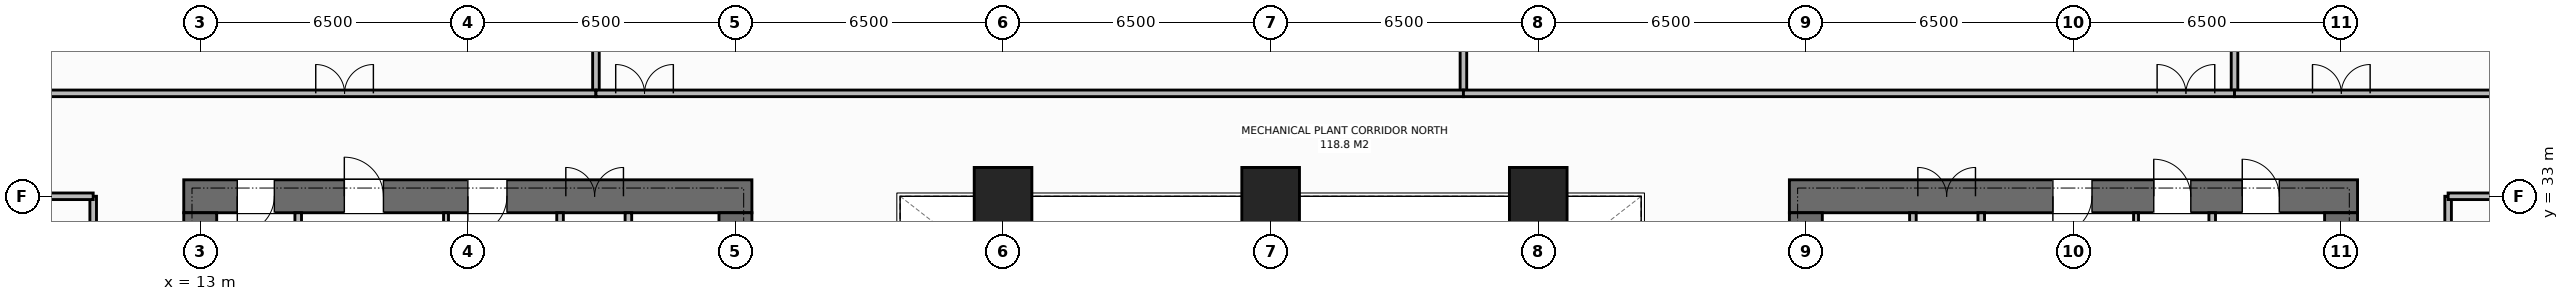
"""IFC4 building model, lengths in metres.
Left out: names, types, materials, properties, quantities, classifications, styles, units other than length and angle.
Written with IfcOpenShell. Run it as: python <this file> out.ifc"""

import sys

from ifc_helpers import new_model, si_unit, direction, frame, frame_2d, origin, origin_2d, place, context, subcontext, project, spatial, rectangle, extrude, element, fill, save


model = new_model("IFC4")
c1 = context("Model", 3, precision=1e-05, world=origin(), true_north=direction((0.0, 1.0)))
c2 = subcontext(c1, "Body", "Model", "MODEL_VIEW")
j1 = project(units=[si_unit("LENGTHUNIT", "METRE"), si_unit("PLANEANGLEUNIT", "RADIAN")], contexts=[c1])
p1 = place(None, origin())
s1 = spatial("IfcSite", under=j1, at=p1, CompositionType="ELEMENT")
p2 = place(p1, origin())
s2 = spatial("IfcBuilding", under=s1, at=p2, CompositionType="ELEMENT")
p3 = place(p2, frame((0.0, 0.0, 81.0)))
s3 = spatial("IfcBuildingStorey", under=s2, at=p3, CompositionType="ELEMENT", Elevation=81.0)
p4 = place(p3, frame((12.6, 33.0, 0.0), z_axis=(0.0, 0.0, 1.0), x_axis=(1.0, 0.0, 0.0)))
e1 = element("IfcWall", 1, at=p4, inside=s3, PredefinedType="SHEAR", context=c2, shape_type="SweptSolid", body=[
    extrude(rectangle(XDim=13.8, YDim=0.8, at=frame_2d((6.9, 0.0))), origin(), (0.0, 0.0, 1.0), 5.0),
])
p5 = place(p4, frame((1.3, 0.0, 0.0)))
e2 = element("IfcOpeningElement", 2, at=p5, cuts=e1, PredefinedType="OPENING", context=c2, shape_type="SweptSolid", body=[
    extrude(rectangle(XDim=0.9, YDim=2.15, at=frame_2d((0.45, 1.075))), frame((0.0, 0.41, 0.0), z_axis=(0.0, -1.0, 0.0), x_axis=(1.0, 0.0, 0.0)), (0.0, 0.0, 1.0), 0.82),
])
p6 = place(p4, frame((3.9, 0.0, 0.0)))
e3 = element("IfcOpeningElement", 3, at=p6, cuts=e1, PredefinedType="OPENING", context=c2, shape_type="SweptSolid", body=[
    extrude(rectangle(XDim=0.95, YDim=2.15, at=frame_2d((0.475, 1.075))), frame((0.0, 0.41, 0.0), z_axis=(0.0, -1.0, 0.0), x_axis=(1.0, 0.0, 0.0)), (0.0, 0.0, 1.0), 0.82),
])
p7 = place(p4, frame((6.9, 0.0, 0.0)))
e4 = element("IfcOpeningElement", 4, at=p7, cuts=e1, PredefinedType="OPENING", context=c2, shape_type="SweptSolid", body=[
    extrude(rectangle(XDim=0.95, YDim=2.15, at=frame_2d((0.475, 1.075))), frame((0.0, 0.41, 0.0), z_axis=(0.0, -1.0, 0.0), x_axis=(1.0, 0.0, 0.0)), (0.0, 0.0, 1.0), 0.82),
])
p8 = place(p4, frame((9.28, 0.0, 0.0)))
e5 = element("IfcOpeningElement", 5, at=p8, cuts=e1, PredefinedType="OPENING", context=c2, shape_type="SweptSolid", body=[
    extrude(rectangle(XDim=1.4, YDim=2.2, at=frame_2d((0.7, 1.1))), frame((0.0, 0.41, 0.0), z_axis=(0.0, -1.0, 0.0), x_axis=(1.0, 0.0, 0.0)), (0.0, 0.0, 1.0), 0.82),
])
p9 = place(p3, frame((13.0, 19.4, 0.0), z_axis=(0.0, 0.0, 1.0), x_axis=(0.0, 1.0, 0.0)))
e6 = element("IfcWall", 6, at=p9, inside=s3, PredefinedType="SHEAR", context=c2, shape_type="SweptSolid", body=[
    extrude(rectangle(XDim=13.2, YDim=0.8, at=frame_2d((6.6, 0.0))), origin(), (0.0, 0.0, 1.0), 5.0),
])
p10 = place(p9, frame((4.65, 0.0, 0.0)))
e7 = element("IfcOpeningElement", 7, at=p10, cuts=e6, PredefinedType="OPENING", context=c2, shape_type="SweptSolid", body=[
    extrude(rectangle(XDim=1.4, YDim=2.2, at=frame_2d((0.7, 1.1))), frame((0.0, 0.41, 0.0), z_axis=(0.0, -1.0, 0.0), x_axis=(1.0, 0.0, 0.0)), (0.0, 0.0, 1.0), 0.82),
])
p11 = place(p3, frame((26.0, 19.4, 0.0), z_axis=(0.0, 0.0, 1.0), x_axis=(0.0, 1.0, 0.0)))
e8 = element("IfcWall", 8, at=p11, inside=s3, PredefinedType="SHEAR", context=c2, shape_type="SweptSolid", body=[
    extrude(rectangle(XDim=13.2, YDim=0.8, at=frame_2d((6.6, 0.0))), origin(), (0.0, 0.0, 1.0), 5.0),
])
p12 = place(p3, frame((51.6, 33.0, 0.0), z_axis=(0.0, 0.0, 1.0), x_axis=(1.0, 0.0, 0.0)))
e9 = element("IfcWall", 9, at=p12, inside=s3, PredefinedType="SHEAR", context=c2, shape_type="SweptSolid", body=[
    extrude(rectangle(XDim=13.8, YDim=0.8, at=frame_2d((6.9, 0.0))), origin(), (0.0, 0.0, 1.0), 5.0),
])
p13 = place(p12, frame((3.12, 0.0, 0.0)))
e10 = element("IfcOpeningElement", 10, at=p13, cuts=e9, PredefinedType="OPENING", context=c2, shape_type="SweptSolid", body=[
    extrude(rectangle(XDim=1.4, YDim=2.2, at=frame_2d((0.7, 1.1))), frame((0.0, 0.41, 0.0), z_axis=(0.0, -1.0, 0.0), x_axis=(1.0, 0.0, 0.0)), (0.0, 0.0, 1.0), 0.82),
])
p14 = place(p12, frame((11.0, 0.0, 0.0)))
e11 = element("IfcOpeningElement", 11, at=p14, cuts=e9, PredefinedType="OPENING", context=c2, shape_type="SweptSolid", body=[
    extrude(rectangle(XDim=0.9, YDim=2.15, at=frame_2d((0.45, 1.075))), frame((0.0, 0.41, 0.0), z_axis=(0.0, -1.0, 0.0), x_axis=(1.0, 0.0, 0.0)), (0.0, 0.0, 1.0), 0.82),
])
p15 = place(p12, frame((6.4, 0.0, 0.0)))
e12 = element("IfcOpeningElement", 12, at=p15, cuts=e9, PredefinedType="OPENING", context=c2, shape_type="SweptSolid", body=[
    extrude(rectangle(XDim=0.95, YDim=2.15, at=frame_2d((0.475, 1.075))), frame((0.0, 0.41, 0.0), z_axis=(0.0, -1.0, 0.0), x_axis=(1.0, 0.0, 0.0)), (0.0, 0.0, 1.0), 0.82),
])
p16 = place(p12, frame((8.85, 0.0, 0.0)))
e13 = element("IfcOpeningElement", 13, at=p16, cuts=e9, PredefinedType="OPENING", context=c2, shape_type="SweptSolid", body=[
    extrude(rectangle(XDim=0.9, YDim=2.15, at=frame_2d((0.45, 1.075))), frame((0.0, 0.41, 0.0), z_axis=(0.0, -1.0, 0.0), x_axis=(1.0, 0.0, 0.0)), (0.0, 0.0, 1.0), 0.82),
])
p17 = place(p3, frame((52.0, 19.4, 0.0), z_axis=(0.0, 0.0, 1.0), x_axis=(0.0, 1.0, 0.0)))
e14 = element("IfcWall", 14, at=p17, inside=s3, PredefinedType="SHEAR", context=c2, shape_type="SweptSolid", body=[
    extrude(rectangle(XDim=13.2, YDim=0.8, at=frame_2d((6.6, 0.0))), origin(), (0.0, 0.0, 1.0), 5.0),
])
p18 = place(p3, frame((65.0, 19.4, 0.0), z_axis=(0.0, 0.0, 1.0), x_axis=(0.0, 1.0, 0.0)))
e15 = element("IfcWall", 15, at=p18, inside=s3, PredefinedType="SHEAR", context=c2, shape_type="SweptSolid", body=[
    extrude(rectangle(XDim=13.2, YDim=0.8, at=frame_2d((6.6, 0.0))), origin(), (0.0, 0.0, 1.0), 5.0),
])
p19 = place(p18, frame((8.05, 0.0, 0.0)))
e16 = element("IfcOpeningElement", 16, at=p19, cuts=e15, PredefinedType="OPENING", context=c2, shape_type="SweptSolid", body=[
    extrude(rectangle(XDim=1.3, YDim=2.2, at=frame_2d((0.65, 1.1))), frame((0.0, 0.41, 0.0), z_axis=(0.0, -1.0, 0.0), x_axis=(1.0, 0.0, 0.0)), (0.0, 0.0, 1.0), 0.82),
])
for number, where, z_axis, x_axis in (
    (17, (32.5, 33.0, 0.0), (0.0, 0.0, 1.0), (1.0, 0.0, 0.0)),
    (18, (39.0, 33.0, 0.0), (0.0, 0.0, 1.0), (1.0, 0.0, 0.0)),
    (19, (45.5, 33.0, 0.0), (0.0, 0.0, 1.0), (1.0, 0.0, 0.0)),
):
    element("IfcColumn", number, at=place(p3, frame(where, z_axis=z_axis, x_axis=x_axis)), inside=s3, PredefinedType="COLUMN", context=c2, shape_type="SweptSolid", body=[
        extrude(rectangle(XDim=1.4, YDim=1.4, at=origin_2d()), origin(), (0.0, 0.0, 1.0), 5.0),
    ])
p20 = place(p3, frame((15.38, 26.56, 0.0), z_axis=(0.0, 0.0, 1.0), x_axis=(0.0, 1.0, 0.0)))
e20 = element("IfcWall", 20, at=p20, inside=s3, PredefinedType="STANDARD", context=c2, shape_type="SweptSolid", body=[
    extrude(rectangle(XDim=6.04, YDim=0.16, at=frame_2d((3.02, 0.0))), origin(), (0.0, 0.0, 1.0), 4.765),
])
p21 = place(p3, frame((18.97, 26.56, 0.0), z_axis=(0.0, 0.0, 1.0), x_axis=(0.0, 1.0, 0.0)))
e21 = element("IfcWall", 21, at=p21, inside=s3, PredefinedType="PARTITIONING", context=c2, shape_type="SweptSolid", body=[
    extrude(rectangle(XDim=6.04, YDim=0.12, at=frame_2d((3.02, 0.0))), origin(), (0.0, 0.0, 1.0), 4.765),
])
p22 = place(p3, frame((21.74, 26.56, 0.0), z_axis=(0.0, 0.0, 1.0), x_axis=(0.0, 1.0, 0.0)))
e22 = element("IfcWall", 22, at=p22, inside=s3, PredefinedType="STANDARD", context=c2, shape_type="SweptSolid", body=[
    extrude(rectangle(XDim=6.04, YDim=0.16, at=frame_2d((3.02, 0.0))), origin(), (0.0, 0.0, 1.0), 4.765),
])
p23 = place(p3, frame((23.4, 19.4, 0.0), z_axis=(0.0, 0.0, 1.0), x_axis=(0.0, 1.0, 0.0)))
e23 = element("IfcWall", 23, at=p23, inside=s3, PredefinedType="STANDARD", context=c2, shape_type="SweptSolid", body=[
    extrude(rectangle(XDim=13.2, YDim=0.16, at=frame_2d((6.6, 0.0))), origin(), (0.0, 0.0, 1.0), 4.765),
])
p24 = place(p23, frame((0.55, 0.0, 0.0)))
e24 = element("IfcOpeningElement", 24, at=p24, cuts=e23, PredefinedType="OPENING", context=c2, shape_type="SweptSolid", body=[
    extrude(rectangle(XDim=1.1, YDim=2.2, at=frame_2d((0.55, 1.1))), frame((0.0, 0.09, 0.0), z_axis=(0.0, -1.0, 0.0), x_axis=(1.0, 0.0, 0.0)), (0.0, 0.0, 1.0), 0.18),
])
p25 = place(p23, frame((2.7, 0.0, 0.0)))
e25 = element("IfcOpeningElement", 25, at=p25, cuts=e23, PredefinedType="OPENING", context=c2, shape_type="SweptSolid", body=[
    extrude(rectangle(XDim=1.1, YDim=2.2, at=frame_2d((0.55, 1.1))), frame((0.0, 0.09, 0.0), z_axis=(0.0, -1.0, 0.0), x_axis=(1.0, 0.0, 0.0)), (0.0, 0.0, 1.0), 0.18),
])
p26 = place(p3, frame((54.6, 19.4, 0.0), z_axis=(0.0, 0.0, 1.0), x_axis=(0.0, 1.0, 0.0)))
e26 = element("IfcWall", 26, at=p26, inside=s3, PredefinedType="STANDARD", context=c2, shape_type="SweptSolid", body=[
    extrude(rectangle(XDim=13.2, YDim=0.16, at=frame_2d((6.6, 0.0))), origin(), (0.0, 0.0, 1.0), 4.765),
])
p27 = place(p26, frame((0.55, 0.0, 0.0)))
e27 = element("IfcOpeningElement", 27, at=p27, cuts=e26, PredefinedType="OPENING", context=c2, shape_type="SweptSolid", body=[
    extrude(rectangle(XDim=1.1, YDim=2.2, at=frame_2d((0.55, 1.1))), frame((0.0, 0.09, 0.0), z_axis=(0.0, -1.0, 0.0), x_axis=(1.0, 0.0, 0.0)), (0.0, 0.0, 1.0), 0.18),
])
p28 = place(p26, frame((2.7, 0.0, 0.0)))
e28 = element("IfcOpeningElement", 28, at=p28, cuts=e26, PredefinedType="OPENING", context=c2, shape_type="SweptSolid", body=[
    extrude(rectangle(XDim=1.1, YDim=2.2, at=frame_2d((0.55, 1.1))), frame((0.0, 0.09, 0.0), z_axis=(0.0, -1.0, 0.0), x_axis=(1.0, 0.0, 0.0)), (0.0, 0.0, 1.0), 0.18),
])
p29 = place(p3, frame((56.26, 23.09, 0.0), z_axis=(0.0, 0.0, 1.0), x_axis=(0.0, 1.0, 0.0)))
e29 = element("IfcWall", 29, at=p29, inside=s3, PredefinedType="STANDARD", context=c2, shape_type="SweptSolid", body=[
    extrude(rectangle(XDim=9.51, YDim=0.16, at=frame_2d((4.755, 0.0))), origin(), (0.0, 0.0, 1.0), 4.765),
])
p30 = place(p29, frame((1.01, 0.0, 0.0)))
e30 = element("IfcOpeningElement", 30, at=p30, cuts=e29, PredefinedType="OPENING", context=c2, shape_type="SweptSolid", body=[
    extrude(rectangle(XDim=1.3, YDim=2.2, at=frame_2d((0.65, 1.1))), frame((0.0, 0.09, 0.0), z_axis=(0.0, -1.0, 0.0), x_axis=(1.0, 0.0, 0.0)), (0.0, 0.0, 1.0), 0.18),
])
p31 = place(p3, frame((61.87, 26.56, 0.0), z_axis=(0.0, 0.0, 1.0), x_axis=(0.0, 1.0, 0.0)))
e31 = element("IfcWall", 31, at=p31, inside=s3, PredefinedType="STANDARD", context=c2, shape_type="SweptSolid", body=[
    extrude(rectangle(XDim=6.04, YDim=0.16, at=frame_2d((3.02, 0.0))), origin(), (0.0, 0.0, 1.0), 4.765),
])
p32 = place(p3, frame((60.02, 26.56, 0.0), z_axis=(0.0, 0.0, 1.0), x_axis=(0.0, 1.0, 0.0)))
e32 = element("IfcWall", 32, at=p32, inside=s3, PredefinedType="PARTITIONING", context=c2, shape_type="SweptSolid", body=[
    extrude(rectangle(XDim=6.04, YDim=0.12, at=frame_2d((3.02, 0.0))), origin(), (0.0, 0.0, 1.0), 4.765),
])
p33 = place(p3, frame((10.4, 19.0, 0.0), z_axis=(0.0, 0.0, 1.0), x_axis=(0.0, 1.0, 0.0)))
e33 = element("IfcWall", 33, at=p33, inside=s3, PredefinedType="STANDARD", context=c2, shape_type="SweptSolid", body=[
    extrude(rectangle(XDim=14.0, YDim=0.16, at=frame_2d((7.0, 0.0))), origin(), (0.0, 0.0, 1.0), 4.765),
])
p34 = place(p33, frame((5.2, 0.0, 0.0)))
e34 = element("IfcOpeningElement", 34, at=p34, cuts=e33, PredefinedType="OPENING", context=c2, shape_type="SweptSolid", body=[
    extrude(rectangle(XDim=1.4, YDim=2.2, at=frame_2d((0.7, 1.1))), frame((0.0, 0.09, 0.0), z_axis=(0.0, -1.0, 0.0), x_axis=(1.0, 0.0, 0.0)), (0.0, 0.0, 1.0), 0.18),
])
p35 = place(p3, frame((-0.18, 33.0, 0.0), z_axis=(0.0, 0.0, 1.0), x_axis=(1.0, 0.0, 0.0)))
e35 = element("IfcWall", 35, at=p35, inside=s3, PredefinedType="STANDARD", context=c2, shape_type="SweptSolid", body=[
    extrude(rectangle(XDim=10.58, YDim=0.16, at=frame_2d((5.29, 0.0))), origin(), (0.0, 0.0, 1.0), 3.245),
])
p36 = place(p3, frame((67.6, 19.0, 0.0), z_axis=(0.0, 0.0, 1.0), x_axis=(0.0, 1.0, 0.0)))
e36 = element("IfcWall", 36, at=p36, inside=s3, PredefinedType="STANDARD", context=c2, shape_type="SweptSolid", body=[
    extrude(rectangle(XDim=14.0, YDim=0.16, at=frame_2d((7.0, 0.0))), origin(), (0.0, 0.0, 1.0), 4.765),
])
p37 = place(p36, frame((5.2, 0.0, 0.0)))
e37 = element("IfcOpeningElement", 37, at=p37, cuts=e36, PredefinedType="OPENING", context=c2, shape_type="SweptSolid", body=[
    extrude(rectangle(XDim=1.4, YDim=2.2, at=frame_2d((0.7, 1.1))), frame((0.0, 0.09, 0.0), z_axis=(0.0, -1.0, 0.0), x_axis=(1.0, 0.0, 0.0)), (0.0, 0.0, 1.0), 0.18),
])
p38 = place(p3, frame((67.6, 33.0, 0.0), z_axis=(0.0, 0.0, 1.0), x_axis=(1.0, 0.0, 0.0)))
e38 = element("IfcWall", 38, at=p38, inside=s3, PredefinedType="STANDARD", context=c2, shape_type="SweptSolid", body=[
    extrude(rectangle(XDim=10.58, YDim=0.16, at=frame_2d((5.29, 0.0))), origin(), (0.0, 0.0, 1.0), 3.245),
])
p39 = place(p3, frame((22.612, 35.5, 0.0), z_axis=(0.0, 0.0, 1.0), x_axis=(0.0, 1.0, 0.0)))
e39 = element("IfcWall", 39, at=p39, inside=s3, PredefinedType="STANDARD", context=c2, shape_type="SweptSolid", body=[
    extrude(rectangle(XDim=15.41, YDim=0.16, at=frame_2d((7.705, 0.0))), origin(), (0.0, 0.0, 1.0), 4.765),
])
p40 = place(p3, frame((-0.18, 35.5, 0.0), z_axis=(0.0, 0.0, 1.0), x_axis=(1.0, 0.0, 0.0)))
e40 = element("IfcWall", 40, at=p40, inside=s3, PredefinedType="STANDARD", context=c2, shape_type="SweptSolid", body=[
    extrude(rectangle(XDim=22.792, YDim=0.16, at=frame_2d((11.396, 0.0))), origin(), (0.0, 0.0, 1.0), 4.765),
])
p41 = place(p40, frame((15.986, 0.0, 0.0)))
e41 = element("IfcOpeningElement", 41, at=p41, cuts=e40, PredefinedType="OPENING", context=c2, shape_type="SweptSolid", body=[
    extrude(rectangle(XDim=1.4, YDim=2.2, at=frame_2d((0.7, 1.1))), frame((0.0, 0.09, 0.0), z_axis=(0.0, -1.0, 0.0), x_axis=(1.0, 0.0, 0.0)), (0.0, 0.0, 1.0), 0.18),
])
p42 = place(p3, frame((43.682, 35.5, 0.0), z_axis=(0.0, 0.0, 1.0), x_axis=(0.0, 1.0, 0.0)))
e42 = element("IfcWall", 42, at=p42, inside=s3, PredefinedType="STANDARD", context=c2, shape_type="SweptSolid", body=[
    extrude(rectangle(XDim=15.41, YDim=0.16, at=frame_2d((7.705, 0.0))), origin(), (0.0, 0.0, 1.0), 4.765),
])
p43 = place(p3, frame((22.612, 35.5, 0.0), z_axis=(0.0, 0.0, 1.0), x_axis=(1.0, 0.0, 0.0)))
e43 = element("IfcWall", 43, at=p43, inside=s3, PredefinedType="STANDARD", context=c2, shape_type="SweptSolid", body=[
    extrude(rectangle(XDim=21.071, YDim=0.16, at=frame_2d((10.535, 0.0))), origin(), (0.0, 0.0, 1.0), 4.765),
])
p44 = place(p43, frame((0.48, 0.0, 0.0)))
e44 = element("IfcOpeningElement", 44, at=p44, cuts=e43, PredefinedType="OPENING", context=c2, shape_type="SweptSolid", body=[
    extrude(rectangle(XDim=1.4, YDim=2.2, at=frame_2d((0.7, 1.1))), frame((0.0, 0.09, 0.0), z_axis=(0.0, -1.0, 0.0), x_axis=(1.0, 0.0, 0.0)), (0.0, 0.0, 1.0), 0.18),
])
p45 = place(p3, frame((62.412, 35.5, 0.0), z_axis=(0.0, 0.0, 1.0), x_axis=(0.0, 1.0, 0.0)))
e45 = element("IfcWall", 45, at=p45, inside=s3, PredefinedType="STANDARD", context=c2, shape_type="SweptSolid", body=[
    extrude(rectangle(XDim=15.41, YDim=0.16, at=frame_2d((7.705, 0.0))), origin(), (0.0, 0.0, 1.0), 4.765),
])
p46 = place(p3, frame((43.682, 35.5, 0.0), z_axis=(0.0, 0.0, 1.0), x_axis=(1.0, 0.0, 0.0)))
e46 = element("IfcWall", 46, at=p46, inside=s3, PredefinedType="STANDARD", context=c2, shape_type="SweptSolid", body=[
    extrude(rectangle(XDim=18.73, YDim=0.16, at=frame_2d((9.365, 0.0))), origin(), (0.0, 0.0, 1.0), 4.765),
])
p47 = place(p46, frame((16.85, 0.0, 0.0)))
e47 = element("IfcOpeningElement", 47, at=p47, cuts=e46, PredefinedType="OPENING", context=c2, shape_type="SweptSolid", body=[
    extrude(rectangle(XDim=1.4, YDim=2.2, at=frame_2d((0.7, 1.1))), frame((0.0, 0.09, 0.0), z_axis=(0.0, -1.0, 0.0), x_axis=(1.0, 0.0, 0.0)), (0.0, 0.0, 1.0), 0.18),
])
p48 = place(p3, frame((62.412, 35.5, 0.0), z_axis=(0.0, 0.0, 1.0), x_axis=(1.0, 0.0, 0.0)))
e48 = element("IfcWall", 48, at=p48, inside=s3, PredefinedType="STANDARD", context=c2, shape_type="SweptSolid", body=[
    extrude(rectangle(XDim=15.768, YDim=0.16, at=frame_2d((7.884, 0.0))), origin(), (0.0, 0.0, 1.0), 4.765),
])
p49 = place(p48, frame((1.894, 0.0, 0.0)))
e49 = element("IfcOpeningElement", 49, at=p49, cuts=e48, PredefinedType="OPENING", context=c2, shape_type="SweptSolid", body=[
    extrude(rectangle(XDim=1.4, YDim=2.2, at=frame_2d((0.7, 1.1))), frame((0.0, 0.09, 0.0), z_axis=(0.0, -1.0, 0.0), x_axis=(1.0, 0.0, 0.0)), (0.0, 0.0, 1.0), 0.18),
])
p50 = place(p5, origin())
e50 = element("IfcDoor", 50, at=p50, inside=s3, OperationType="SINGLE_SWING_RIGHT", PredefinedType="DOOR", context=c2, shape_type="SweptSolid", body=[
    extrude(rectangle(XDim=0.9, YDim=2.15, at=frame_2d((0.45, 1.075))), frame((0.0, -0.075, 0.0), z_axis=(0.0, -1.0, 0.0), x_axis=(1.0, 0.0, 0.0)), (0.0, 0.0, 1.0), 0.05),
])
fill(e2, e50)
p51 = place(p6, origin())
e51 = element("IfcDoor", 51, at=p51, inside=s3, OperationType="SINGLE_SWING_LEFT", PredefinedType="DOOR", context=c2, shape_type="SweptSolid", body=[
    extrude(rectangle(XDim=0.95, YDim=2.15, at=frame_2d((0.475, 1.075))), frame((0.0, -0.075, 0.0), z_axis=(0.0, -1.0, 0.0), x_axis=(1.0, 0.0, 0.0)), (0.0, 0.0, 1.0), 0.05),
])
fill(e3, e51)
p52 = place(p7, origin())
e52 = element("IfcDoor", 52, at=p52, inside=s3, OperationType="SINGLE_SWING_RIGHT", PredefinedType="DOOR", context=c2, shape_type="SweptSolid", body=[
    extrude(rectangle(XDim=0.95, YDim=2.15, at=frame_2d((0.475, 1.075))), frame((0.0, -0.075, 0.0), z_axis=(0.0, -1.0, 0.0), x_axis=(1.0, 0.0, 0.0)), (0.0, 0.0, 1.0), 0.05),
])
fill(e4, e52)
p53 = place(p8, origin())
e53 = element("IfcDoor", 53, at=p53, inside=s3, OperationType="DOUBLE_DOOR_SINGLE_SWING", PredefinedType="DOOR", context=c2, shape_type="SweptSolid", body=[
    extrude(rectangle(XDim=1.4, YDim=2.2, at=frame_2d((0.7, 1.1))), frame((0.0, -0.075, 0.0), z_axis=(0.0, -1.0, 0.0), x_axis=(1.0, 0.0, 0.0)), (0.0, 0.0, 1.0), 0.05),
])
fill(e5, e53)
p54 = place(p13, origin())
e54 = element("IfcDoor", 54, at=p54, inside=s3, OperationType="DOUBLE_DOOR_SINGLE_SWING", PredefinedType="DOOR", context=c2, shape_type="SweptSolid", body=[
    extrude(rectangle(XDim=1.4, YDim=2.2, at=frame_2d((0.7, 1.1))), frame((0.0, -0.075, 0.0), z_axis=(0.0, -1.0, 0.0), x_axis=(1.0, 0.0, 0.0)), (0.0, 0.0, 1.0), 0.05),
])
fill(e10, e54)
p55 = place(p14, origin())
e55 = element("IfcDoor", 55, at=p55, inside=s3, OperationType="SINGLE_SWING_LEFT", PredefinedType="DOOR", context=c2, shape_type="SweptSolid", body=[
    extrude(rectangle(XDim=0.9, YDim=2.15, at=frame_2d((0.45, 1.075))), frame((0.0, -0.075, 0.0), z_axis=(0.0, -1.0, 0.0), x_axis=(1.0, 0.0, 0.0)), (0.0, 0.0, 1.0), 0.05),
])
fill(e11, e55)
p56 = place(p15, origin())
e56 = element("IfcDoor", 56, at=p56, inside=s3, OperationType="SINGLE_SWING_RIGHT", PredefinedType="DOOR", context=c2, shape_type="SweptSolid", body=[
    extrude(rectangle(XDim=0.95, YDim=2.15, at=frame_2d((0.475, 1.075))), frame((0.0, -0.075, 0.0), z_axis=(0.0, -1.0, 0.0), x_axis=(1.0, 0.0, 0.0)), (0.0, 0.0, 1.0), 0.05),
])
fill(e12, e56)
p57 = place(p16, origin())
e57 = element("IfcDoor", 57, at=p57, inside=s3, OperationType="SINGLE_SWING_LEFT", PredefinedType="DOOR", context=c2, shape_type="SweptSolid", body=[
    extrude(rectangle(XDim=0.9, YDim=2.15, at=frame_2d((0.45, 1.075))), frame((0.0, -0.075, 0.0), z_axis=(0.0, -1.0, 0.0), x_axis=(1.0, 0.0, 0.0)), (0.0, 0.0, 1.0), 0.05),
])
fill(e13, e57)
p58 = place(p41, origin())
e58 = element("IfcDoor", 58, at=p58, inside=s3, OperationType="DOUBLE_DOOR_SINGLE_SWING", PredefinedType="DOOR", context=c2, shape_type="SweptSolid", body=[
    extrude(rectangle(XDim=1.4, YDim=2.2, at=frame_2d((0.7, 1.1))), frame((0.0, 0.025, 0.0), z_axis=(0.0, -1.0, 0.0), x_axis=(1.0, 0.0, 0.0)), (0.0, 0.0, 1.0), 0.05),
])
fill(e41, e58)
p59 = place(p44, origin())
e59 = element("IfcDoor", 59, at=p59, inside=s3, OperationType="DOUBLE_DOOR_SINGLE_SWING", PredefinedType="DOOR", context=c2, shape_type="SweptSolid", body=[
    extrude(rectangle(XDim=1.4, YDim=2.2, at=frame_2d((0.7, 1.1))), frame((0.0, 0.025, 0.0), z_axis=(0.0, -1.0, 0.0), x_axis=(1.0, 0.0, 0.0)), (0.0, 0.0, 1.0), 0.05),
])
fill(e44, e59)
p60 = place(p47, origin())
e60 = element("IfcDoor", 60, at=p60, inside=s3, OperationType="DOUBLE_DOOR_SINGLE_SWING", PredefinedType="DOOR", context=c2, shape_type="SweptSolid", body=[
    extrude(rectangle(XDim=1.4, YDim=2.2, at=frame_2d((0.7, 1.1))), frame((0.0, 0.025, 0.0), z_axis=(0.0, -1.0, 0.0), x_axis=(1.0, 0.0, 0.0)), (0.0, 0.0, 1.0), 0.05),
])
fill(e47, e60)
p61 = place(p49, origin())
e61 = element("IfcDoor", 61, at=p61, inside=s3, OperationType="DOUBLE_DOOR_SINGLE_SWING", PredefinedType="DOOR", context=c2, shape_type="SweptSolid", body=[
    extrude(rectangle(XDim=1.4, YDim=2.2, at=frame_2d((0.7, 1.1))), frame((0.0, 0.025, 0.0), z_axis=(0.0, -1.0, 0.0), x_axis=(1.0, 0.0, 0.0)), (0.0, 0.0, 1.0), 0.05),
])
fill(e49, e61)
save(model, sys.argv[1])
